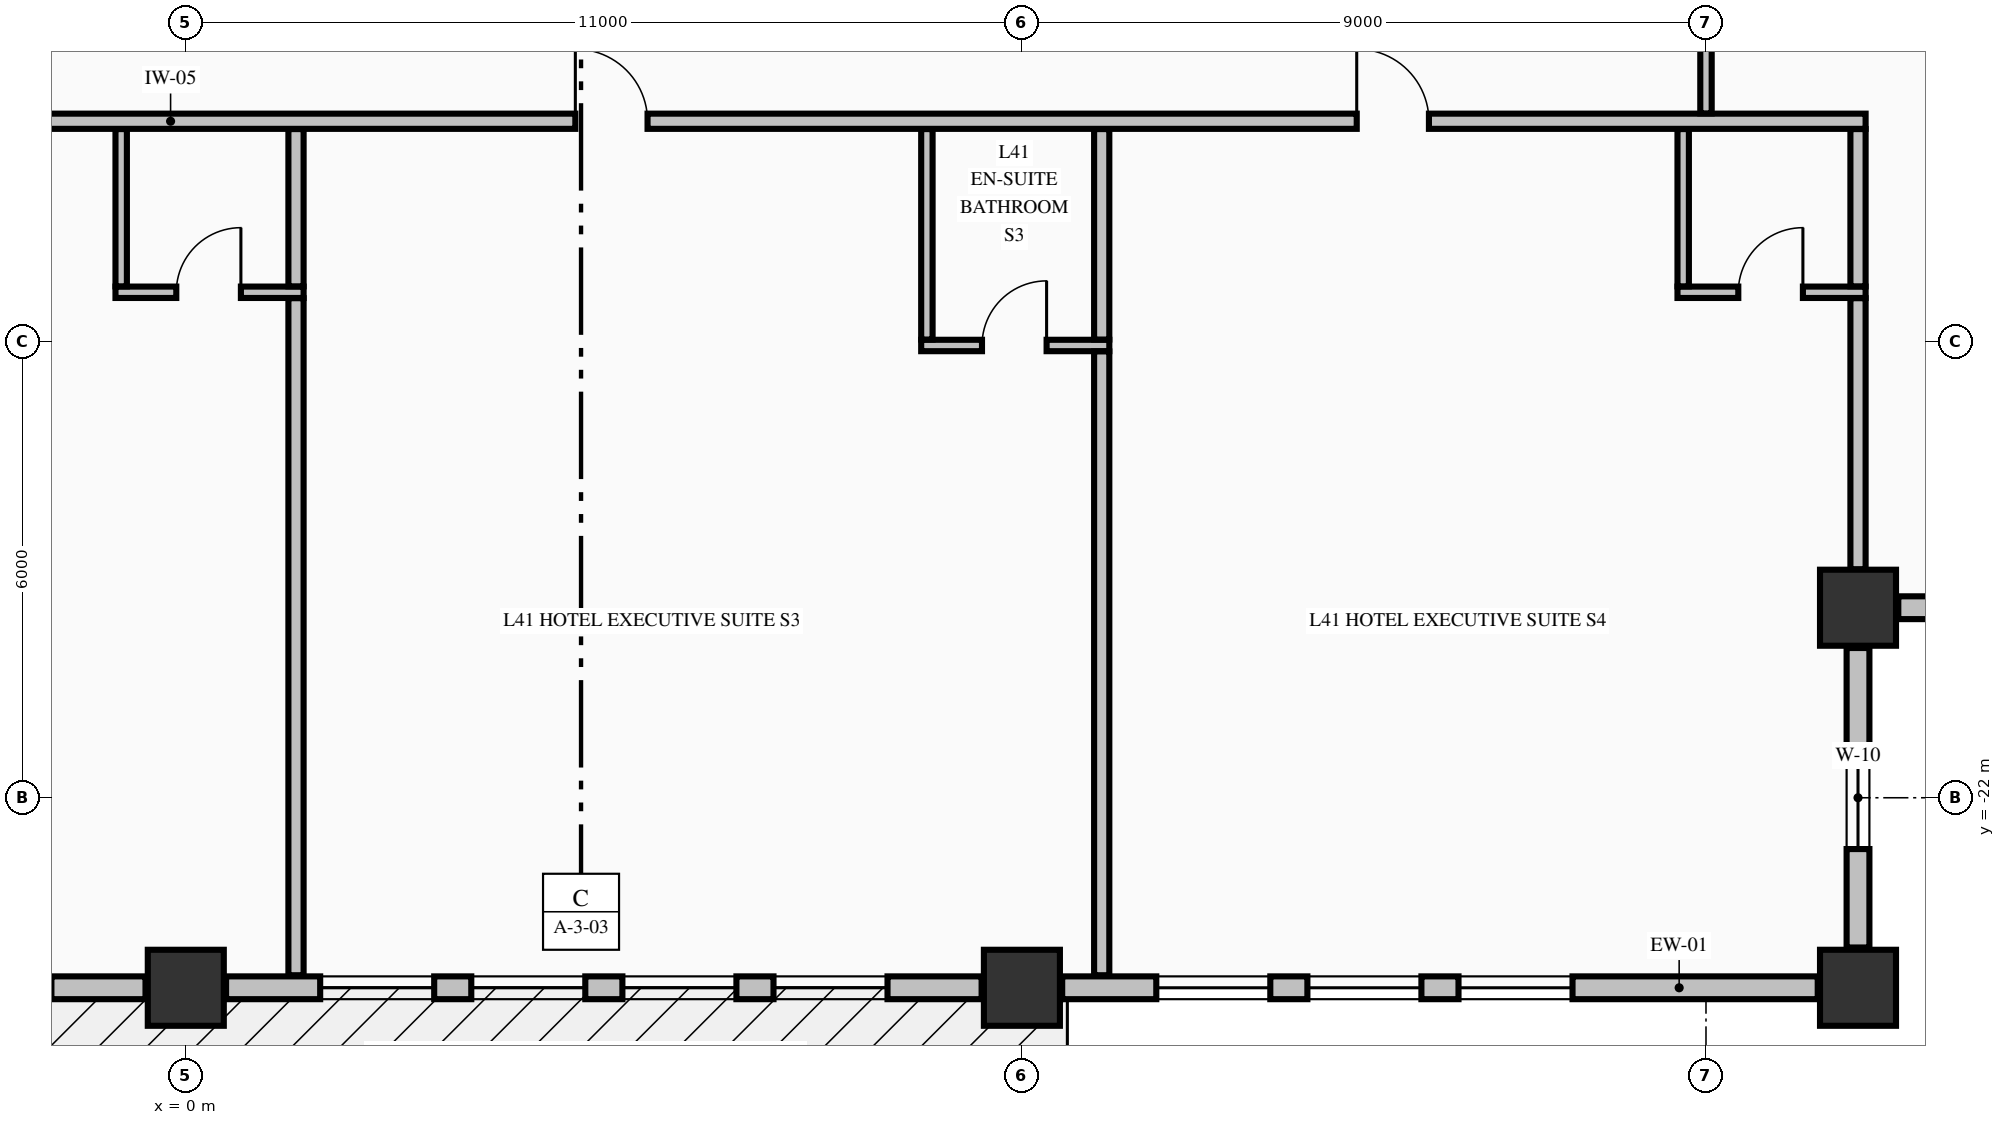
"""IFC4 building model, lengths in metres.
Left out: names, types, materials, properties, quantities, classifications, styles, units other than length and angle.
Written with IfcOpenShell. Run it as: python <this file> out.ifc"""

import sys

from ifc_helpers import new_model, si_unit, direction, frame, frame_2d, origin, origin_2d, place, context, subcontext, project, spatial, rectangle, extrude, element, fill, save


model = new_model("IFC4")
c1 = context("Model", 3, precision=1e-05, world=origin(), true_north=direction((0.0, 1.0)))
c2 = subcontext(c1, "Body", "Model", "MODEL_VIEW")
j1 = project(units=[si_unit("LENGTHUNIT", "METRE"), si_unit("PLANEANGLEUNIT", "RADIAN")], contexts=[c1])
p1 = place(None, origin())
s1 = spatial("IfcSite", under=j1, at=p1, CompositionType="ELEMENT")
p2 = place(p1, origin())
s2 = spatial("IfcBuilding", under=s1, at=p2, CompositionType="ELEMENT")
p3 = place(p2, frame((0.0, 0.0, 162.66)))
s3 = spatial("IfcBuildingStorey", under=s2, at=p3, CompositionType="ELEMENT", Elevation=162.66)
for number, where, z_axis, x_axis in (
    (1, (0.0, -24.5, -0.25), (0.0, 0.0, 1.0), (1.0, 0.0, 0.0)),
    (2, (11.0, -24.5, -0.25), (0.0, 0.0, 1.0), (1.0, 0.0, 0.0)),
    (3, (22.0, -24.5, -0.25), (0.0, 0.0, 1.0), (1.0, 0.0, 0.0)),
    (4, (22.0, -19.5, -0.25), (0.0, 0.0, 1.0), (1.0, 0.0, 0.0)),
):
    element("IfcColumn", number, at=place(p3, frame(where, z_axis=z_axis, x_axis=x_axis)), inside=s3, PredefinedType="COLUMN", context=c2, shape_type="SweptSolid", body=[
        extrude(rectangle(XDim=1.0, YDim=1.0, at=origin_2d()), origin(), (0.0, 0.0, 1.0), 3.4),
    ])
p4 = place(p3, frame((22.0, -23.97, 0.0), z_axis=(0.0, 0.0, 1.0), x_axis=(0.0, 1.0, 0.0)))
e5 = element("IfcWall", 5, at=p4, inside=s3, PredefinedType="STANDARD", context=c2, shape_type="SweptSolid", body=[
    extrude(rectangle(XDim=3.94, YDim=0.3, at=frame_2d((1.97, 0.0))), origin(), (0.0, 0.0, 1.0), 2.542),
])
p5 = place(p4, frame((1.295, 0.0, 0.68)))
e6 = element("IfcOpeningElement", 6, at=p5, cuts=e5, PredefinedType="OPENING", context=c2, shape_type="SweptSolid", body=[
    extrude(rectangle(XDim=1.35, YDim=1.42, at=frame_2d((0.675, 0.71))), frame((0.0, 0.16, 0.0), z_axis=(0.0, -1.0, 0.0), x_axis=(1.0, 0.0, 0.0)), (0.0, 0.0, 1.0), 0.32),
])
p6 = place(p3, frame((22.53, -19.5, 0.0), z_axis=(0.0, 0.0, 1.0), x_axis=(1.0, 0.0, 0.0)))
e7 = element("IfcWall", 7, at=p6, inside=s3, PredefinedType="STANDARD", context=c2, shape_type="SweptSolid", body=[
    extrude(rectangle(XDim=3.94, YDim=0.3, at=frame_2d((1.97, 0.0))), origin(), (0.0, 0.0, 1.0), 2.542),
])
p7 = place(p6, frame((1.295, 0.0, 0.68)))
e8 = element("IfcOpeningElement", 8, at=p7, cuts=e7, PredefinedType="OPENING", context=c2, shape_type="SweptSolid", body=[
    extrude(rectangle(XDim=1.35, YDim=1.42, at=frame_2d((0.675, 0.71))), frame((0.0, 0.16, 0.0), z_axis=(0.0, -1.0, 0.0), x_axis=(1.0, 0.0, 0.0)), (0.0, 0.0, 1.0), 0.32),
])
p8 = place(p3, frame((-10.47, -24.5, 0.0), z_axis=(0.0, 0.0, 1.0), x_axis=(1.0, 0.0, 0.0)))
e9 = element("IfcWall", 9, at=p8, inside=s3, PredefinedType="STANDARD", context=c2, shape_type="SweptSolid", body=[
    extrude(rectangle(XDim=9.94, YDim=0.3, at=frame_2d((4.97, 0.0))), origin(), (0.0, 0.0, 1.0), 2.542),
])
p9 = place(p8, frame((5.123, 0.0, 0.0)))
e10 = element("IfcOpeningElement", 10, at=p9, cuts=e9, PredefinedType="OPENING", context=c2, shape_type="SweptSolid", body=[
    extrude(rectangle(XDim=1.1, YDim=2.15, at=frame_2d((0.55, 1.075))), frame((0.0, 0.16, 0.0), z_axis=(0.0, -1.0, 0.0), x_axis=(1.0, 0.0, 0.0)), (0.0, 0.0, 1.0), 0.32),
])
p10 = place(p8, frame((1.238, 0.0, 0.72)))
e11 = element("IfcOpeningElement", 11, at=p10, cuts=e9, PredefinedType="OPENING", context=c2, shape_type="SweptSolid", body=[
    extrude(rectangle(XDim=1.5, YDim=1.6, at=frame_2d((0.75, 0.8))), frame((0.0, 0.16, 0.0), z_axis=(0.0, -1.0, 0.0), x_axis=(1.0, 0.0, 0.0)), (0.0, 0.0, 1.0), 0.32),
])
p11 = place(p8, frame((7.202, 0.0, 0.72)))
e12 = element("IfcOpeningElement", 12, at=p11, cuts=e9, PredefinedType="OPENING", context=c2, shape_type="SweptSolid", body=[
    extrude(rectangle(XDim=1.5, YDim=1.6, at=frame_2d((0.75, 0.8))), frame((0.0, 0.16, 0.0), z_axis=(0.0, -1.0, 0.0), x_axis=(1.0, 0.0, 0.0)), (0.0, 0.0, 1.0), 0.32),
])
p12 = place(p3, frame((0.53, -24.5, 0.0), z_axis=(0.0, 0.0, 1.0), x_axis=(1.0, 0.0, 0.0)))
e13 = element("IfcWall", 13, at=p12, inside=s3, PredefinedType="STANDARD", context=c2, shape_type="SweptSolid", body=[
    extrude(rectangle(XDim=9.94, YDim=0.3, at=frame_2d((4.97, 0.0))), origin(), (0.0, 0.0, 1.0), 2.542),
])
p13 = place(p12, frame((1.238, 0.0, 0.72)))
e14 = element("IfcOpeningElement", 14, at=p13, cuts=e13, PredefinedType="OPENING", context=c2, shape_type="SweptSolid", body=[
    extrude(rectangle(XDim=1.5, YDim=1.6, at=frame_2d((0.75, 0.8))), frame((0.0, 0.16, 0.0), z_axis=(0.0, -1.0, 0.0), x_axis=(1.0, 0.0, 0.0)), (0.0, 0.0, 1.0), 0.32),
])
p14 = place(p12, frame((3.226, 0.0, 0.72)))
e15 = element("IfcOpeningElement", 15, at=p14, cuts=e13, PredefinedType="OPENING", context=c2, shape_type="SweptSolid", body=[
    extrude(rectangle(XDim=1.5, YDim=1.6, at=frame_2d((0.75, 0.8))), frame((0.0, 0.16, 0.0), z_axis=(0.0, -1.0, 0.0), x_axis=(1.0, 0.0, 0.0)), (0.0, 0.0, 1.0), 0.32),
])
p15 = place(p12, frame((5.214, 0.0, 0.72)))
e16 = element("IfcOpeningElement", 16, at=p15, cuts=e13, PredefinedType="OPENING", context=c2, shape_type="SweptSolid", body=[
    extrude(rectangle(XDim=1.5, YDim=1.6, at=frame_2d((0.75, 0.8))), frame((0.0, 0.16, 0.0), z_axis=(0.0, -1.0, 0.0), x_axis=(1.0, 0.0, 0.0)), (0.0, 0.0, 1.0), 0.32),
])
p16 = place(p12, frame((7.202, 0.0, 0.72)))
e17 = element("IfcOpeningElement", 17, at=p16, cuts=e13, PredefinedType="OPENING", context=c2, shape_type="SweptSolid", body=[
    extrude(rectangle(XDim=1.5, YDim=1.6, at=frame_2d((0.75, 0.8))), frame((0.0, 0.16, 0.0), z_axis=(0.0, -1.0, 0.0), x_axis=(1.0, 0.0, 0.0)), (0.0, 0.0, 1.0), 0.32),
])
p17 = place(p3, frame((11.53, -24.5, 0.0), z_axis=(0.0, 0.0, 1.0), x_axis=(1.0, 0.0, 0.0)))
e18 = element("IfcWall", 18, at=p17, inside=s3, PredefinedType="STANDARD", context=c2, shape_type="SweptSolid", body=[
    extrude(rectangle(XDim=9.94, YDim=0.3, at=frame_2d((4.97, 0.0))), origin(), (0.0, 0.0, 1.0), 2.542),
])
p18 = place(p17, frame((1.238, 0.0, 0.72)))
e19 = element("IfcOpeningElement", 19, at=p18, cuts=e18, PredefinedType="OPENING", context=c2, shape_type="SweptSolid", body=[
    extrude(rectangle(XDim=1.5, YDim=1.6, at=frame_2d((0.75, 0.8))), frame((0.0, 0.16, 0.0), z_axis=(0.0, -1.0, 0.0), x_axis=(1.0, 0.0, 0.0)), (0.0, 0.0, 1.0), 0.32),
])
p19 = place(p17, frame((3.226, 0.0, 0.72)))
e20 = element("IfcOpeningElement", 20, at=p19, cuts=e18, PredefinedType="OPENING", context=c2, shape_type="SweptSolid", body=[
    extrude(rectangle(XDim=1.5, YDim=1.6, at=frame_2d((0.75, 0.8))), frame((0.0, 0.16, 0.0), z_axis=(0.0, -1.0, 0.0), x_axis=(1.0, 0.0, 0.0)), (0.0, 0.0, 1.0), 0.32),
])
p20 = place(p17, frame((5.214, 0.0, 0.72)))
e21 = element("IfcOpeningElement", 21, at=p20, cuts=e18, PredefinedType="OPENING", context=c2, shape_type="SweptSolid", body=[
    extrude(rectangle(XDim=1.5, YDim=1.6, at=frame_2d((0.75, 0.8))), frame((0.0, 0.16, 0.0), z_axis=(0.0, -1.0, 0.0), x_axis=(1.0, 0.0, 0.0)), (0.0, 0.0, 1.0), 0.32),
])
p21 = place(p3, frame((9.675, -16.05, 0.0), z_axis=(0.0, 0.0, 1.0), x_axis=(1.0, 0.0, 0.0)))
e22 = element("IfcWall", 22, at=p21, inside=s3, PredefinedType="PARTITIONING", context=c2, shape_type="SweptSolid", body=[
    extrude(rectangle(XDim=2.475, YDim=0.15, at=frame_2d((1.237, 0.0))), origin(), (0.0, 0.0, 1.0), 3.15),
])
p22 = place(p21, frame((0.8, 0.0, 0.0)))
e23 = element("IfcOpeningElement", 23, at=p22, cuts=e22, PredefinedType="OPENING", context=c2, shape_type="SweptSolid", body=[
    extrude(rectangle(XDim=0.85, YDim=2.1, at=frame_2d((0.425, 1.05))), frame((0.0, 0.085, 0.0), z_axis=(0.0, -1.0, 0.0), x_axis=(1.0, 0.0, 0.0)), (0.0, 0.0, 1.0), 0.17),
])
p23 = place(p3, frame((-0.925, -15.35, 0.0), z_axis=(0.0, 0.0, 1.0), x_axis=(1.0, 0.0, 0.0)))
e24 = element("IfcWall", 24, at=p23, inside=s3, PredefinedType="PARTITIONING", context=c2, shape_type="SweptSolid", body=[
    extrude(rectangle(XDim=2.475, YDim=0.15, at=frame_2d((1.238, 0.0))), origin(), (0.0, 0.0, 1.0), 3.15),
])
p24 = place(p23, frame((0.8, 0.0, 0.0)))
e25 = element("IfcOpeningElement", 25, at=p24, cuts=e24, PredefinedType="OPENING", context=c2, shape_type="SweptSolid", body=[
    extrude(rectangle(XDim=0.85, YDim=2.1, at=frame_2d((0.425, 1.05))), frame((0.0, 0.085, 0.0), z_axis=(0.0, -1.0, 0.0), x_axis=(1.0, 0.0, 0.0)), (0.0, 0.0, 1.0), 0.17),
])
p25 = place(p3, frame((19.625, -15.35, 0.0), z_axis=(0.0, 0.0, 1.0), x_axis=(1.0, 0.0, 0.0)))
e26 = element("IfcWall", 26, at=p25, inside=s3, PredefinedType="PARTITIONING", context=c2, shape_type="SweptSolid", body=[
    extrude(rectangle(XDim=2.475, YDim=0.15, at=frame_2d((1.238, 0.0))), origin(), (0.0, 0.0, 1.0), 3.15),
])
p26 = place(p25, frame((0.8, 0.0, 0.0)))
e27 = element("IfcOpeningElement", 27, at=p26, cuts=e26, PredefinedType="OPENING", context=c2, shape_type="SweptSolid", body=[
    extrude(rectangle(XDim=0.85, YDim=2.1, at=frame_2d((0.425, 1.05))), frame((0.0, 0.085, 0.0), z_axis=(0.0, -1.0, 0.0), x_axis=(1.0, 0.0, 0.0)), (0.0, 0.0, 1.0), 0.17),
])
p27 = place(p3, frame((-17.1, -13.1, 0.0), z_axis=(0.0, 0.0, 1.0), x_axis=(1.0, 0.0, 0.0)))
e28 = element("IfcWall", 28, at=p27, inside=s3, PredefinedType="PARTITIONING", context=c2, shape_type="SweptSolid", body=[
    extrude(rectangle(XDim=39.2, YDim=0.2, at=frame_2d((19.6, 0.0))), origin(), (0.0, 0.0, 1.0), 3.15),
])
p28 = place(p27, frame((2.505, 0.0, 0.0)))
e29 = element("IfcOpeningElement", 29, at=p28, cuts=e28, PredefinedType="OPENING", context=c2, shape_type="SweptSolid", body=[
    extrude(rectangle(XDim=1.05, YDim=2.15, at=frame_2d((0.525, 1.075))), frame((0.0, 0.11, 0.0), z_axis=(0.0, -1.0, 0.0), x_axis=(1.0, 0.0, 0.0)), (0.0, 0.0, 1.0), 0.22),
])
p29 = place(p27, frame((10.625, 0.0, 0.0)))
e30 = element("IfcOpeningElement", 30, at=p29, cuts=e28, PredefinedType="OPENING", context=c2, shape_type="SweptSolid", body=[
    extrude(rectangle(XDim=0.95, YDim=2.15, at=frame_2d((0.475, 1.075))), frame((0.0, 0.11, 0.0), z_axis=(0.0, -1.0, 0.0), x_axis=(1.0, 0.0, 0.0)), (0.0, 0.0, 1.0), 0.22),
])
p30 = place(p27, frame((22.225, 0.0, 0.0)))
e31 = element("IfcOpeningElement", 31, at=p30, cuts=e28, PredefinedType="OPENING", context=c2, shape_type="SweptSolid", body=[
    extrude(rectangle(XDim=0.95, YDim=2.15, at=frame_2d((0.475, 1.075))), frame((0.0, 0.11, 0.0), z_axis=(0.0, -1.0, 0.0), x_axis=(1.0, 0.0, 0.0)), (0.0, 0.0, 1.0), 0.22),
])
p31 = place(p27, frame((32.505, 0.0, 0.0)))
e32 = element("IfcOpeningElement", 32, at=p31, cuts=e28, PredefinedType="OPENING", context=c2, shape_type="SweptSolid", body=[
    extrude(rectangle(XDim=0.95, YDim=2.15, at=frame_2d((0.475, 1.075))), frame((0.0, 0.11, 0.0), z_axis=(0.0, -1.0, 0.0), x_axis=(1.0, 0.0, 0.0)), (0.0, 0.0, 1.0), 0.22),
])
p32 = place(p3, frame((-0.85, -15.272, 0.0), z_axis=(0.0, 0.0, 1.0), x_axis=(0.0, 1.0, 0.0)))
e33 = element("IfcWall", 33, at=p32, inside=s3, PredefinedType="PARTITIONING", context=c2, shape_type="SweptSolid", body=[
    extrude(rectangle(XDim=2.069, YDim=0.15, at=frame_2d((1.035, 0.0))), origin(), (0.0, 0.0, 1.0), 3.15),
])
p33 = place(p3, frame((1.45, -24.335, 0.0), z_axis=(0.0, 0.0, 1.0), x_axis=(0.0, 1.0, 0.0)))
e34 = element("IfcWall", 34, at=p33, inside=s3, PredefinedType="PARTITIONING", context=c2, shape_type="SweptSolid", body=[
    extrude(rectangle(XDim=8.907, YDim=0.2, at=frame_2d((4.454, 0.0))), origin(), (0.0, 0.0, 1.0), 3.15),
])
p34 = place(p3, frame((1.45, -15.272, 0.0), z_axis=(0.0, 0.0, 1.0), x_axis=(0.0, 1.0, 0.0)))
e35 = element("IfcWall", 35, at=p34, inside=s3, PredefinedType="PARTITIONING", context=c2, shape_type="SweptSolid", body=[
    extrude(rectangle(XDim=2.069, YDim=0.2, at=frame_2d((1.035, 0.0))), origin(), (0.0, 0.0, 1.0), 3.15),
])
p35 = place(p3, frame((9.75, -15.972, 0.0), z_axis=(0.0, 0.0, 1.0), x_axis=(0.0, 1.0, 0.0)))
e36 = element("IfcWall", 36, at=p35, inside=s3, PredefinedType="PARTITIONING", context=c2, shape_type="SweptSolid", body=[
    extrude(rectangle(XDim=2.769, YDim=0.15, at=frame_2d((1.385, 0.0))), origin(), (0.0, 0.0, 1.0), 3.15),
])
p36 = place(p3, frame((12.05, -24.335, 0.0), z_axis=(0.0, 0.0, 1.0), x_axis=(0.0, 1.0, 0.0)))
e37 = element("IfcWall", 37, at=p36, inside=s3, PredefinedType="PARTITIONING", context=c2, shape_type="SweptSolid", body=[
    extrude(rectangle(XDim=8.207, YDim=0.2, at=frame_2d((4.104, 0.0))), origin(), (0.0, 0.0, 1.0), 3.15),
])
p37 = place(p3, frame((12.05, -15.972, 0.0), z_axis=(0.0, 0.0, 1.0), x_axis=(0.0, 1.0, 0.0)))
e38 = element("IfcWall", 38, at=p37, inside=s3, PredefinedType="PARTITIONING", context=c2, shape_type="SweptSolid", body=[
    extrude(rectangle(XDim=2.769, YDim=0.2, at=frame_2d((1.385, 0.0))), origin(), (0.0, 0.0, 1.0), 3.15),
])
p38 = place(p3, frame((19.7, -15.272, 0.0), z_axis=(0.0, 0.0, 1.0), x_axis=(0.0, 1.0, 0.0)))
e39 = element("IfcWall", 39, at=p38, inside=s3, PredefinedType="PARTITIONING", context=c2, shape_type="SweptSolid", body=[
    extrude(rectangle(XDim=2.069, YDim=0.15, at=frame_2d((1.035, 0.0))), origin(), (0.0, 0.0, 1.0), 2.342),
])
p39 = place(p3, frame((20.0, -12.997, 0.0), z_axis=(0.0, 0.0, 1.0), x_axis=(0.0, 1.0, 0.0)))
e40 = element("IfcWall", 40, at=p39, inside=s3, PredefinedType="PARTITIONING", context=c2, shape_type="SweptSolid", body=[
    extrude(rectangle(XDim=2.616, YDim=0.15, at=frame_2d((1.308, 0.0))), origin(), (0.0, 0.0, 1.0), 2.342),
])
p40 = place(p3, frame((22.0, -18.994, 0.0), z_axis=(0.0, 0.0, 1.0), x_axis=(0.0, 1.0, 0.0)))
e41 = element("IfcWall", 41, at=p40, inside=s3, PredefinedType="PARTITIONING", context=c2, shape_type="SweptSolid", body=[
    extrude(rectangle(XDim=3.566, YDim=0.2, at=frame_2d((1.783, 0.0))), origin(), (0.0, 0.0, 1.0), 3.15),
])
p41 = place(p3, frame((22.0, -15.272, 0.0), z_axis=(0.0, 0.0, 1.0), x_axis=(0.0, 1.0, 0.0)))
e42 = element("IfcWall", 42, at=p41, inside=s3, PredefinedType="PARTITIONING", context=c2, shape_type="SweptSolid", body=[
    extrude(rectangle(XDim=2.069, YDim=0.2, at=frame_2d((1.035, 0.0))), origin(), (0.0, 0.0, 1.0), 3.15),
])
p42 = place(p5, origin())
e43 = element("IfcWindow", 43, at=p42, inside=s3, PartitioningType="SINGLE_PANEL", PredefinedType="WINDOW", context=c2, shape_type="SweptSolid", body=[
    extrude(rectangle(XDim=1.35, YDim=1.42, at=frame_2d((0.675, 0.71))), frame((0.0, 0.03, 0.0), z_axis=(0.0, -1.0, 0.0), x_axis=(1.0, 0.0, 0.0)), (0.0, 0.0, 1.0), 0.06),
])
fill(e6, e43)
p43 = place(p13, origin())
e44 = element("IfcWindow", 44, at=p43, inside=s3, PartitioningType="SINGLE_PANEL", PredefinedType="WINDOW", context=c2, shape_type="SweptSolid", body=[
    extrude(rectangle(XDim=1.5, YDim=1.6, at=frame_2d((0.75, 0.8))), frame((0.0, 0.03, 0.0), z_axis=(0.0, -1.0, 0.0), x_axis=(1.0, 0.0, 0.0)), (0.0, 0.0, 1.0), 0.06),
])
fill(e14, e44)
p44 = place(p14, origin())
e45 = element("IfcWindow", 45, at=p44, inside=s3, PartitioningType="SINGLE_PANEL", PredefinedType="WINDOW", context=c2, shape_type="SweptSolid", body=[
    extrude(rectangle(XDim=1.5, YDim=1.6, at=frame_2d((0.75, 0.8))), frame((0.0, 0.03, 0.0), z_axis=(0.0, -1.0, 0.0), x_axis=(1.0, 0.0, 0.0)), (0.0, 0.0, 1.0), 0.06),
])
fill(e15, e45)
p45 = place(p15, origin())
e46 = element("IfcWindow", 46, at=p45, inside=s3, PartitioningType="SINGLE_PANEL", PredefinedType="WINDOW", context=c2, shape_type="SweptSolid", body=[
    extrude(rectangle(XDim=1.5, YDim=1.6, at=frame_2d((0.75, 0.8))), frame((0.0, 0.03, 0.0), z_axis=(0.0, -1.0, 0.0), x_axis=(1.0, 0.0, 0.0)), (0.0, 0.0, 1.0), 0.06),
])
fill(e16, e46)
p46 = place(p16, origin())
e47 = element("IfcWindow", 47, at=p46, inside=s3, PartitioningType="SINGLE_PANEL", PredefinedType="WINDOW", context=c2, shape_type="SweptSolid", body=[
    extrude(rectangle(XDim=1.5, YDim=1.6, at=frame_2d((0.75, 0.8))), frame((0.0, 0.03, 0.0), z_axis=(0.0, -1.0, 0.0), x_axis=(1.0, 0.0, 0.0)), (0.0, 0.0, 1.0), 0.06),
])
fill(e17, e47)
p47 = place(p18, origin())
e48 = element("IfcWindow", 48, at=p47, inside=s3, PartitioningType="SINGLE_PANEL", PredefinedType="WINDOW", context=c2, shape_type="SweptSolid", body=[
    extrude(rectangle(XDim=1.5, YDim=1.6, at=frame_2d((0.75, 0.8))), frame((0.0, 0.03, 0.0), z_axis=(0.0, -1.0, 0.0), x_axis=(1.0, 0.0, 0.0)), (0.0, 0.0, 1.0), 0.06),
])
fill(e19, e48)
p48 = place(p19, origin())
e49 = element("IfcWindow", 49, at=p48, inside=s3, PartitioningType="SINGLE_PANEL", PredefinedType="WINDOW", context=c2, shape_type="SweptSolid", body=[
    extrude(rectangle(XDim=1.5, YDim=1.6, at=frame_2d((0.75, 0.8))), frame((0.0, 0.03, 0.0), z_axis=(0.0, -1.0, 0.0), x_axis=(1.0, 0.0, 0.0)), (0.0, 0.0, 1.0), 0.06),
])
fill(e20, e49)
p49 = place(p20, origin())
e50 = element("IfcWindow", 50, at=p49, inside=s3, PartitioningType="SINGLE_PANEL", PredefinedType="WINDOW", context=c2, shape_type="SweptSolid", body=[
    extrude(rectangle(XDim=1.5, YDim=1.6, at=frame_2d((0.75, 0.8))), frame((0.0, 0.03, 0.0), z_axis=(0.0, -1.0, 0.0), x_axis=(1.0, 0.0, 0.0)), (0.0, 0.0, 1.0), 0.06),
])
fill(e21, e50)
p50 = place(p24, origin())
e51 = element("IfcDoor", 51, at=p50, inside=s3, OperationType="SINGLE_SWING_RIGHT", PredefinedType="DOOR", context=c2, shape_type="SweptSolid", body=[
    extrude(rectangle(XDim=0.85, YDim=2.1, at=frame_2d((0.425, 1.05))), frame((0.0, 0.025, 0.0), z_axis=(0.0, -1.0, 0.0), x_axis=(1.0, 0.0, 0.0)), (0.0, 0.0, 1.0), 0.05),
])
fill(e25, e51)
p51 = place(p30, origin())
e52 = element("IfcDoor", 52, at=p51, inside=s3, OperationType="SINGLE_SWING_LEFT", PredefinedType="DOOR", context=c2, shape_type="SweptSolid", body=[
    extrude(rectangle(XDim=0.95, YDim=2.15, at=frame_2d((0.475, 1.075))), frame((0.0, 0.025, 0.0), z_axis=(0.0, -1.0, 0.0), x_axis=(1.0, 0.0, 0.0)), (0.0, 0.0, 1.0), 0.05),
])
fill(e31, e52)
p52 = place(p22, origin())
e53 = element("IfcDoor", 53, at=p52, inside=s3, OperationType="SINGLE_SWING_RIGHT", PredefinedType="DOOR", context=c2, shape_type="SweptSolid", body=[
    extrude(rectangle(XDim=0.85, YDim=2.1, at=frame_2d((0.425, 1.05))), frame((0.0, 0.025, 0.0), z_axis=(0.0, -1.0, 0.0), x_axis=(1.0, 0.0, 0.0)), (0.0, 0.0, 1.0), 0.05),
])
fill(e23, e53)
p53 = place(p31, origin())
e54 = element("IfcDoor", 54, at=p53, inside=s3, OperationType="SINGLE_SWING_LEFT", PredefinedType="DOOR", context=c2, shape_type="SweptSolid", body=[
    extrude(rectangle(XDim=0.95, YDim=2.15, at=frame_2d((0.475, 1.075))), frame((0.0, 0.025, 0.0), z_axis=(0.0, -1.0, 0.0), x_axis=(1.0, 0.0, 0.0)), (0.0, 0.0, 1.0), 0.05),
])
fill(e32, e54)
p54 = place(p26, origin())
e55 = element("IfcDoor", 55, at=p54, inside=s3, OperationType="SINGLE_SWING_RIGHT", PredefinedType="DOOR", context=c2, shape_type="SweptSolid", body=[
    extrude(rectangle(XDim=0.85, YDim=2.1, at=frame_2d((0.425, 1.05))), frame((0.0, 0.025, 0.0), z_axis=(0.0, -1.0, 0.0), x_axis=(1.0, 0.0, 0.0)), (0.0, 0.0, 1.0), 0.05),
])
fill(e27, e55)
save(model, sys.argv[1])
